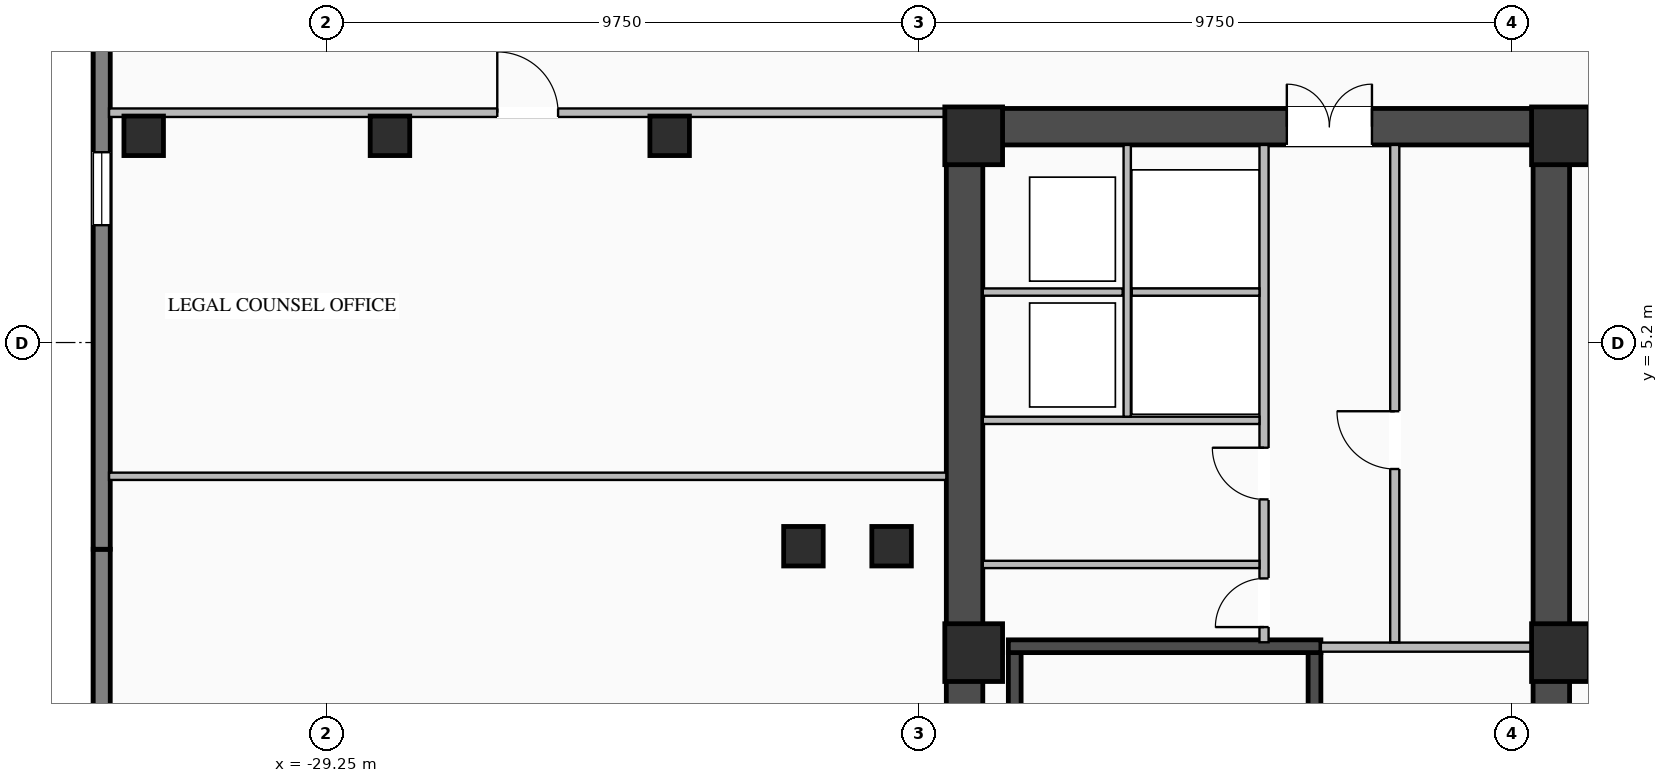
"""IFC4 building model, lengths in metres.
Left out: names, types, materials, properties, quantities, classifications, styles, units other than length and angle.
Written with IfcOpenShell. Run it as: python <this file> out.ifc"""

import sys

from ifc_helpers import new_model, si_unit, direction, frame, frame_2d, origin, origin_2d, place, context, subcontext, project, spatial, rectangle, i_section, extrude, element, fill, save


model = new_model("IFC4")
c1 = context("Model", 3, precision=1e-05, world=origin(), true_north=direction((0.0, 1.0)))
c2 = subcontext(c1, "Body", "Model", "MODEL_VIEW")
j1 = project(units=[si_unit("LENGTHUNIT", "METRE"), si_unit("PLANEANGLEUNIT", "RADIAN")], contexts=[c1])
p1 = place(None, origin())
s1 = spatial("IfcSite", under=j1, at=p1, CompositionType="ELEMENT")
p2 = place(p1, origin())
s2 = spatial("IfcBuilding", under=s1, at=p2, CompositionType="ELEMENT")
p3 = place(p2, frame((0.0, 0.0, 120.85)))
s3 = spatial("IfcBuildingStorey", under=s2, at=p3, CompositionType="ELEMENT", Elevation=120.85)
p4 = place(p3, frame((-19.05, 8.75, 0.0), z_axis=(0.0, 0.0, 1.0), x_axis=(1.0, 0.0, 0.0)))
e1 = element("IfcWall", 1, at=p4, inside=s3, PredefinedType="SHEAR", context=c2, shape_type="SweptSolid", body=[
    extrude(rectangle(XDim=10.25, YDim=0.6, at=frame_2d((5.125, 0.0))), origin(), (0.0, 0.0, 1.0), 3.27),
])
p5 = place(p4, frame((5.6, 0.0, 0.0)))
e2 = element("IfcOpeningElement", 2, at=p5, cuts=e1, PredefinedType="OPENING", context=c2, shape_type="SweptSolid", body=[
    extrude(rectangle(XDim=1.4, YDim=2.05, at=frame_2d((0.7, 1.025))), frame((0.0, 0.31, 0.0), z_axis=(0.0, -1.0, 0.0), x_axis=(1.0, 0.0, 0.0)), (0.0, 0.0, 1.0), 0.62),
])
p6 = place(p3, frame((-18.75, -8.45, 0.0), z_axis=(0.0, 0.0, 1.0), x_axis=(0.0, 1.0, 0.0)))
e3 = element("IfcWall", 3, at=p6, inside=s3, PredefinedType="SHEAR", context=c2, shape_type="SweptSolid", body=[
    extrude(rectangle(XDim=16.9, YDim=0.6, at=frame_2d((8.45, 0.0))), origin(), (0.0, 0.0, 1.0), 3.27),
])
p7 = place(p3, frame((-9.1, -8.45, 0.0), z_axis=(0.0, 0.0, 1.0), x_axis=(0.0, 1.0, 0.0)))
e4 = element("IfcWall", 4, at=p7, inside=s3, PredefinedType="SHEAR", context=c2, shape_type="SweptSolid", body=[
    extrude(rectangle(XDim=16.9, YDim=0.6, at=frame_2d((8.45, 0.0))), origin(), (0.0, 0.0, 1.0), 3.27),
])
p8 = place(p7, frame((5.2, 0.0, 0.0)))
e5 = element("IfcOpeningElement", 5, at=p8, cuts=e4, PredefinedType="OPENING", context=c2, shape_type="SweptSolid", body=[
    extrude(rectangle(XDim=1.1, YDim=2.08, at=frame_2d((0.55, 1.04))), frame((0.0, 0.31, 0.0), z_axis=(0.0, -1.0, 0.0), x_axis=(1.0, 0.0, 0.0)), (0.0, 0.0, 1.0), 0.62),
])
p9 = place(p3, frame((-12.995, -8.1, 0.0), z_axis=(0.0, 0.0, 1.0), x_axis=(0.0, 1.0, 0.0)))
e6 = element("IfcWall", 6, at=p9, inside=s3, PredefinedType="SHEAR", context=c2, shape_type="SweptSolid", body=[
    extrude(rectangle(XDim=8.2, YDim=0.21, at=frame_2d((4.1, 0.0))), origin(), (0.0, 0.0, 1.0), 3.27),
])
p10 = place(p9, frame((6.25, 0.0, 0.0)))
e7 = element("IfcOpeningElement", 7, at=p10, cuts=e6, PredefinedType="OPENING", context=c2, shape_type="SweptSolid", body=[
    extrude(rectangle(XDim=1.1, YDim=2.15, at=frame_2d((0.55, 1.075))), frame((0.0, 0.115, 0.0), z_axis=(0.0, -1.0, 0.0), x_axis=(1.0, 0.0, 0.0)), (0.0, 0.0, 1.0), 0.23),
])
p11 = place(p3, frame((-17.925, -8.1, 0.0), z_axis=(0.0, 0.0, 1.0), x_axis=(0.0, 1.0, 0.0)))
e8 = element("IfcWall", 8, at=p11, inside=s3, PredefinedType="SHEAR", context=c2, shape_type="SweptSolid", body=[
    extrude(rectangle(XDim=8.2, YDim=0.21, at=frame_2d((4.1, 0.0))), origin(), (0.0, 0.0, 1.0), 3.27),
])
p12 = place(p3, frame((-12.89, 0.205, 0.0), z_axis=(0.0, 0.0, 1.0), x_axis=(-1.0, 0.0, 0.0)))
e9 = element("IfcWall", 9, at=p12, inside=s3, PredefinedType="SHEAR", context=c2, shape_type="SweptSolid", body=[
    extrude(rectangle(XDim=5.14, YDim=0.21, at=frame_2d((2.57, 0.0))), origin(), (0.0, 0.0, 1.0), 3.27),
])
for number, where, z_axis, x_axis in (
    (10, (-8.95, 0.1, 0.0), (0.0, 0.0, 1.0), (1.0, 0.0, 0.0)),
    (11, (-8.95, 8.6, 0.0), (0.0, 0.0, 1.0), (1.0, 0.0, 0.0)),
    (12, (-18.6, 0.1, 0.0), (0.0, 0.0, 1.0), (1.0, 0.0, 0.0)),
    (13, (-18.6, 8.6, 0.0), (0.0, 0.0, 1.0), (1.0, 0.0, 0.0)),
):
    element("IfcColumn", number, at=place(p3, frame(where, z_axis=z_axis, x_axis=x_axis)), inside=s3, PredefinedType="COLUMN", context=c2, shape_type="SweptSolid", body=[
        extrude(rectangle(XDim=0.95, YDim=0.95, at=origin_2d()), origin(), (0.0, 0.0, 1.0), 3.45),
    ])
for number, where, z_axis, x_axis in (
    (14, (-21.4, 1.85, 0.0), (0.0, 0.0, 1.0), (1.0, 0.0, 0.0)),
    (15, (-19.95, 1.85, 0.0), (0.0, 0.0, 1.0), (1.0, 0.0, 0.0)),
    (16, (-23.6, 8.6, 0.0), (0.0, 0.0, 1.0), (1.0, 0.0, 0.0)),
    (17, (-28.2, 8.6, 0.0), (0.0, 0.0, 1.0), (1.0, 0.0, 0.0)),
    (18, (-32.25, 8.6, 0.0), (0.0, 0.0, 1.0), (1.0, 0.0, 0.0)),
):
    element("IfcColumn", number, at=place(p3, frame(where, z_axis=z_axis, x_axis=x_axis)), inside=s3, PredefinedType="COLUMN", context=c2, shape_type="SweptSolid", body=[
        extrude(i_section(OverallWidth=0.65, OverallDepth=0.65, WebThickness=0.028, FlangeThickness=0.04, at=origin_2d()), origin(), (0.0, 0.0, 1.0), 3.45),
    ])
p13 = place(p3, frame((-32.94, -15.99, 0.0), z_axis=(0.0, 0.0, 1.0), x_axis=(0.0, 1.0, 0.0)))
e19 = element("IfcWall", 19, at=p13, inside=s3, PredefinedType="STANDARD", context=c2, shape_type="SweptSolid", body=[
    extrude(rectangle(XDim=17.79, YDim=0.28, at=frame_2d((8.895, 0.0))), origin(), (0.0, 0.0, 1.0), 3.25),
])
p14 = place(p13, frame((5.33, 0.0, 0.76)))
e20 = element("IfcOpeningElement", 20, at=p14, cuts=e19, PredefinedType="OPENING", context=c2, shape_type="SweptSolid", body=[
    extrude(rectangle(XDim=1.2, YDim=1.95, at=frame_2d((0.6, 0.975))), frame((0.0, 0.15, 0.0), z_axis=(0.0, -1.0, 0.0), x_axis=(1.0, 0.0, 0.0)), (0.0, 0.0, 1.0), 0.3),
])
p15 = place(p13, frame((11.26, 0.0, 0.76)))
e21 = element("IfcOpeningElement", 21, at=p15, cuts=e19, PredefinedType="OPENING", context=c2, shape_type="SweptSolid", body=[
    extrude(rectangle(XDim=1.2, YDim=1.95, at=frame_2d((0.6, 0.975))), frame((0.0, 0.15, 0.0), z_axis=(0.0, -1.0, 0.0), x_axis=(1.0, 0.0, 0.0)), (0.0, 0.0, 1.0), 0.3),
])
p16 = place(p3, frame((-32.94, 1.8, 0.0), z_axis=(0.0, 0.0, 1.0), x_axis=(0.0, 1.0, 0.0)))
e22 = element("IfcWall", 22, at=p16, inside=s3, PredefinedType="STANDARD", context=c2, shape_type="SweptSolid", body=[
    extrude(rectangle(XDim=17.79, YDim=0.28, at=frame_2d((8.895, 0.0))), origin(), (0.0, 0.0, 1.0), 3.25),
])
p17 = place(p16, frame((5.33, 0.0, 0.76)))
e23 = element("IfcOpeningElement", 23, at=p17, cuts=e22, PredefinedType="OPENING", context=c2, shape_type="SweptSolid", body=[
    extrude(rectangle(XDim=1.2, YDim=1.95, at=frame_2d((0.6, 0.975))), frame((0.0, 0.15, 0.0), z_axis=(0.0, -1.0, 0.0), x_axis=(1.0, 0.0, 0.0)), (0.0, 0.0, 1.0), 0.3),
])
p18 = place(p16, frame((11.26, 0.0, 0.76)))
e24 = element("IfcOpeningElement", 24, at=p18, cuts=e22, PredefinedType="OPENING", context=c2, shape_type="SweptSolid", body=[
    extrude(rectangle(XDim=1.2, YDim=1.95, at=frame_2d((0.6, 0.975))), frame((0.0, 0.15, 0.0), z_axis=(0.0, -1.0, 0.0), x_axis=(1.0, 0.0, 0.0)), (0.0, 0.0, 1.0), 0.3),
])
p19 = place(p3, frame((-12.89, 0.19, 0.0), z_axis=(0.0, 0.0, 1.0), x_axis=(1.0, 0.0, 0.0)))
e25 = element("IfcWall", 25, at=p19, inside=s3, PredefinedType="STANDARD", context=c2, shape_type="SweptSolid", body=[
    extrude(rectangle(XDim=3.49, YDim=0.15, at=frame_2d((1.745, 0.0))), origin(), (0.0, 0.0, 1.0), 2.645),
])
p20 = place(p3, frame((-11.675, 0.27, 0.0), z_axis=(0.0, 0.0, 1.0), x_axis=(0.0, 1.0, 0.0)))
e26 = element("IfcWall", 26, at=p20, inside=s3, PredefinedType="STANDARD", context=c2, shape_type="SweptSolid", body=[
    extrude(rectangle(XDim=8.18, YDim=0.15, at=frame_2d((4.09, 0.0))), origin(), (0.0, 0.0, 1.0), 3.25),
])
p21 = place(p20, frame((2.85, 0.0, 0.0)))
e27 = element("IfcOpeningElement", 27, at=p21, cuts=e26, PredefinedType="OPENING", context=c2, shape_type="SweptSolid", body=[
    extrude(rectangle(XDim=0.95, YDim=2.05, at=frame_2d((0.475, 1.025))), frame((0.0, 0.085, 0.0), z_axis=(0.0, -1.0, 0.0), x_axis=(1.0, 0.0, 0.0)), (0.0, 0.0, 1.0), 0.17),
])
p22 = place(p3, frame((-13.825, 0.27, 0.0), z_axis=(0.0, 0.0, 1.0), x_axis=(0.0, 1.0, 0.0)))
e28 = element("IfcWall", 28, at=p22, inside=s3, PredefinedType="STANDARD", context=c2, shape_type="SweptSolid", body=[
    extrude(rectangle(XDim=8.18, YDim=0.15, at=frame_2d((4.09, 0.0))), origin(), (0.0, 0.0, 1.0), 3.25),
])
p23 = place(p22, frame((0.25, 0.0, 0.0)))
e29 = element("IfcOpeningElement", 29, at=p23, cuts=e28, PredefinedType="OPENING", context=c2, shape_type="SweptSolid", body=[
    extrude(rectangle(XDim=0.8, YDim=2.05, at=frame_2d((0.4, 1.025))), frame((0.0, 0.085, 0.0), z_axis=(0.0, -1.0, 0.0), x_axis=(1.0, 0.0, 0.0)), (0.0, 0.0, 1.0), 0.17),
])
p24 = place(p22, frame((2.35, 0.0, 0.0)))
e30 = element("IfcOpeningElement", 30, at=p24, cuts=e28, PredefinedType="OPENING", context=c2, shape_type="SweptSolid", body=[
    extrude(rectangle(XDim=0.85, YDim=2.05, at=frame_2d((0.425, 1.025))), frame((0.0, 0.085, 0.0), z_axis=(0.0, -1.0, 0.0), x_axis=(1.0, 0.0, 0.0)), (0.0, 0.0, 1.0), 0.17),
])
p25 = place(p3, frame((-18.45, 3.92, 0.0), z_axis=(0.0, 0.0, 1.0), x_axis=(1.0, 0.0, 0.0)))
e31 = element("IfcWall", 31, at=p25, inside=s3, PredefinedType="STANDARD", context=c2, shape_type="SweptSolid", body=[
    extrude(rectangle(XDim=4.55, YDim=0.12, at=frame_2d((2.275, 0.0))), origin(), (0.0, 0.0, 1.0), 3.25),
])
p26 = place(p3, frame((-18.45, 6.03, 0.0), z_axis=(0.0, 0.0, 1.0), x_axis=(1.0, 0.0, 0.0)))
e32 = element("IfcWall", 32, at=p26, inside=s3, PredefinedType="STANDARD", context=c2, shape_type="SweptSolid", body=[
    extrude(rectangle(XDim=2.3, YDim=0.12, at=frame_2d((1.15, 0.0))), origin(), (0.0, 0.0, 1.0), 3.25),
])
p27 = place(p3, frame((-16.075, 3.98, 0.0), z_axis=(0.0, 0.0, 1.0), x_axis=(0.0, 1.0, 0.0)))
e33 = element("IfcWall", 33, at=p27, inside=s3, PredefinedType="STANDARD", context=c2, shape_type="SweptSolid", body=[
    extrude(rectangle(XDim=4.47, YDim=0.12, at=frame_2d((2.235, 0.0))), origin(), (0.0, 0.0, 1.0), 3.25),
])
p28 = place(p3, frame((-16.0, 6.03, 0.0), z_axis=(0.0, 0.0, 1.0), x_axis=(1.0, 0.0, 0.0)))
e34 = element("IfcWall", 34, at=p28, inside=s3, PredefinedType="STANDARD", context=c2, shape_type="SweptSolid", body=[
    extrude(rectangle(XDim=2.1, YDim=0.12, at=frame_2d((1.05, 0.0))), origin(), (0.0, 0.0, 1.0), 3.25),
])
p29 = place(p3, frame((-18.45, 1.55, 0.0), z_axis=(0.0, 0.0, 1.0), x_axis=(1.0, 0.0, 0.0)))
e35 = element("IfcWall", 35, at=p29, inside=s3, PredefinedType="STANDARD", context=c2, shape_type="SweptSolid", body=[
    extrude(rectangle(XDim=4.55, YDim=0.12, at=frame_2d((2.275, 0.0))), origin(), (0.0, 0.0, 1.0), 3.25),
])
p30 = place(p3, frame((-32.82, 8.98, 0.0), z_axis=(0.0, 0.0, 1.0), x_axis=(1.0, 0.0, 0.0)))
e36 = element("IfcWall", 36, at=p30, inside=s3, PredefinedType="STANDARD", context=c2, shape_type="SweptSolid", body=[
    extrude(rectangle(XDim=13.77, YDim=0.14, at=frame_2d((6.885, 0.0))), origin(), (0.0, 0.0, 1.0), 3.25),
])
p31 = place(p30, frame((6.385, 0.0, 0.0)))
e37 = element("IfcOpeningElement", 37, at=p31, cuts=e36, PredefinedType="OPENING", context=c2, shape_type="SweptSolid", body=[
    extrude(rectangle(XDim=1.0, YDim=2.08, at=frame_2d((0.5, 1.04))), frame((0.0, 0.08, 0.0), z_axis=(0.0, -1.0, 0.0), x_axis=(1.0, 0.0, 0.0)), (0.0, 0.0, 1.0), 0.16),
])
p32 = place(p3, frame((-32.82, 3.0, 0.0), z_axis=(0.0, 0.0, 1.0), x_axis=(1.0, 0.0, 0.0)))
e38 = element("IfcWall", 38, at=p32, inside=s3, PredefinedType="STANDARD", context=c2, shape_type="SweptSolid", body=[
    extrude(rectangle(XDim=13.77, YDim=0.12, at=frame_2d((6.885, 0.0))), origin(), (0.0, 0.0, 1.0), 3.25),
])
p33 = place(p17, origin())
e39 = element("IfcWindow", 39, at=p33, inside=s3, PartitioningType="SINGLE_PANEL", PredefinedType="WINDOW", context=c2, shape_type="SweptSolid", body=[
    extrude(rectangle(XDim=1.2, YDim=1.95, at=frame_2d((0.6, 0.975))), frame((0.0, 0.03, 0.0), z_axis=(0.0, -1.0, 0.0), x_axis=(1.0, 0.0, 0.0)), (0.0, 0.0, 1.0), 0.06),
])
fill(e23, e39)
p34 = place(p5, origin())
e40 = element("IfcDoor", 40, at=p34, inside=s3, OperationType="DOUBLE_DOOR_SINGLE_SWING", PredefinedType="DOOR", context=c2, shape_type="SweptSolid", body=[
    extrude(rectangle(XDim=1.4, YDim=2.05, at=frame_2d((0.7, 1.025))), frame((0.0, 0.245, 0.0), z_axis=(0.0, -1.0, 0.0), x_axis=(1.0, 0.0, 0.0)), (0.0, 0.0, 1.0), 0.05),
])
fill(e2, e40)
p35 = place(p21, origin())
e41 = element("IfcDoor", 41, at=p35, inside=s3, OperationType="SINGLE_SWING_RIGHT", PredefinedType="DOOR", context=c2, shape_type="SweptSolid", body=[
    extrude(rectangle(XDim=0.95, YDim=2.05, at=frame_2d((0.475, 1.025))), frame((0.0, 0.025, 0.0), z_axis=(0.0, -1.0, 0.0), x_axis=(1.0, 0.0, 0.0)), (0.0, 0.0, 1.0), 0.05),
])
fill(e27, e41)
p36 = place(p23, origin())
e42 = element("IfcDoor", 42, at=p36, inside=s3, OperationType="SINGLE_SWING_LEFT", PredefinedType="DOOR", context=c2, shape_type="SweptSolid", body=[
    extrude(rectangle(XDim=0.8, YDim=2.05, at=frame_2d((0.4, 1.025))), frame((0.0, 0.025, 0.0), z_axis=(0.0, -1.0, 0.0), x_axis=(1.0, 0.0, 0.0)), (0.0, 0.0, 1.0), 0.05),
])
fill(e29, e42)
p37 = place(p24, origin())
e43 = element("IfcDoor", 43, at=p37, inside=s3, OperationType="SINGLE_SWING_RIGHT", PredefinedType="DOOR", context=c2, shape_type="SweptSolid", body=[
    extrude(rectangle(XDim=0.85, YDim=2.05, at=frame_2d((0.425, 1.025))), frame((0.0, 0.025, 0.0), z_axis=(0.0, -1.0, 0.0), x_axis=(1.0, 0.0, 0.0)), (0.0, 0.0, 1.0), 0.05),
])
fill(e30, e43)
p38 = place(p31, origin())
e44 = element("IfcDoor", 44, at=p38, inside=s3, OperationType="SINGLE_SWING_LEFT", PredefinedType="DOOR", context=c2, shape_type="SweptSolid", body=[
    extrude(rectangle(XDim=1.0, YDim=2.08, at=frame_2d((0.5, 1.04))), frame((0.0, 0.025, 0.0), z_axis=(0.0, -1.0, 0.0), x_axis=(1.0, 0.0, 0.0)), (0.0, 0.0, 1.0), 0.05),
])
fill(e37, e44)
save(model, sys.argv[1])
